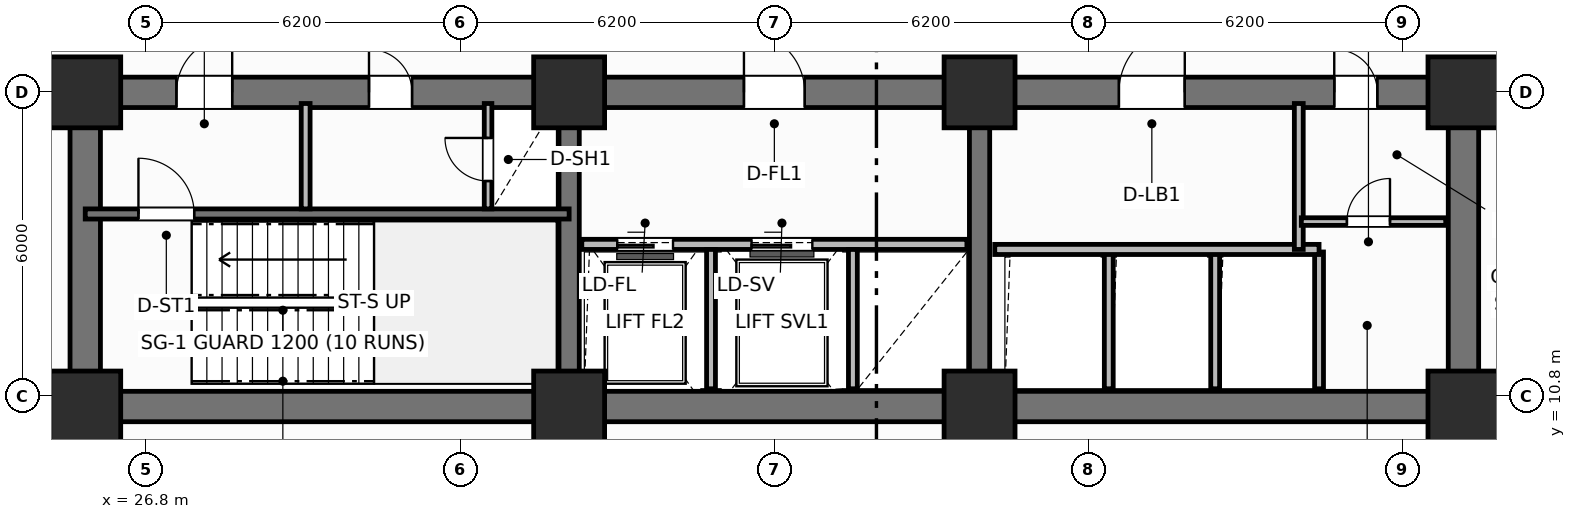
"""IFC4 building model, lengths in metres.
Left out: names, types, materials, properties, quantities, classifications, styles, units other than length and angle.
Written with IfcOpenShell. Run it as: python <this file> out.ifc"""

import sys

from ifc_helpers import new_model, si_unit, direction, frame, frame_2d, origin, origin_2d, place, context, subcontext, project, spatial, rectangle, extrude, element, fill, save


model = new_model("IFC4")
c1 = context("Model", 3, precision=1e-05, world=origin(), true_north=direction((0.0, 1.0)))
c2 = subcontext(c1, "Body", "Model", "MODEL_VIEW")
j1 = project(units=[si_unit("LENGTHUNIT", "METRE"), si_unit("PLANEANGLEUNIT", "RADIAN")], contexts=[c1])
p1 = place(None, origin())
s1 = spatial("IfcSite", under=j1, at=p1, CompositionType="ELEMENT")
p2 = place(p1, origin())
s2 = spatial("IfcBuilding", under=s1, at=p2, CompositionType="ELEMENT")
p3 = place(p2, frame((0.0, 0.0, 20.1)))
s3 = spatial("IfcBuildingStorey", under=s2, at=p3, CompositionType="ELEMENT", Elevation=20.1)
p4 = place(p3, frame((52.8, 10.6, 0.0), z_axis=(0.0, 0.0, 1.0), x_axis=(-1.0, 0.0, 0.0)))
e1 = element("IfcWall", 1, at=p4, inside=s3, PredefinedType="SHEAR", context=c2, shape_type="SweptSolid", body=[
    extrude(rectangle(XDim=27.2, YDim=0.6, at=frame_2d((13.6, 0.0))), origin(), (0.0, 0.0, 1.0), 4.5),
])
for number, where, z_axis, x_axis in (
    (2, (25.6, 10.9, 0.0), (0.0, 0.0, 1.0), (0.0, 1.0, 0.0)),
    (3, (52.8, 10.9, 0.0), (0.0, 0.0, 1.0), (0.0, 1.0, 0.0)),
):
    element("IfcWall", number, at=place(p3, frame(where, z_axis=z_axis, x_axis=x_axis)), inside=s3, PredefinedType="SHEAR", context=c2, shape_type="SweptSolid", body=[
        extrude(rectangle(XDim=5.6, YDim=0.6, at=frame_2d((2.8, 0.0))), origin(), (0.0, 0.0, 1.0), 4.5),
    ])
p5 = place(p3, frame((25.6, 16.8, 0.0), z_axis=(0.0, 0.0, 1.0), x_axis=(1.0, 0.0, 0.0)))
e4 = element("IfcWall", 4, at=p5, inside=s3, PredefinedType="SHEAR", context=c2, shape_type="SweptSolid", body=[
    extrude(rectangle(XDim=27.2, YDim=0.6, at=frame_2d((13.6, 0.0))), origin(), (0.0, 0.0, 1.0), 4.5),
])
p6 = place(p5, frame((1.8, 0.0, 0.0)))
e5 = element("IfcOpeningElement", 5, at=p6, cuts=e4, PredefinedType="OPENING", context=c2, shape_type="SweptSolid", body=[
    extrude(rectangle(XDim=1.1, YDim=2.15, at=frame_2d((0.55, 1.075))), frame((0.0, 0.31, 0.0), z_axis=(0.0, -1.0, 0.0), x_axis=(1.0, 0.0, 0.0)), (0.0, 0.0, 1.0), 0.62),
])
p7 = place(p5, frame((5.6, 0.0, 0.0)))
e6 = element("IfcOpeningElement", 6, at=p7, cuts=e4, PredefinedType="OPENING", context=c2, shape_type="SweptSolid", body=[
    extrude(rectangle(XDim=0.85, YDim=2.1, at=frame_2d((0.425, 1.05))), frame((0.0, 0.31, 0.0), z_axis=(0.0, -1.0, 0.0), x_axis=(1.0, 0.0, 0.0)), (0.0, 0.0, 1.0), 0.62),
])
p8 = place(p5, frame((13.0, 0.0, 0.0)))
e7 = element("IfcOpeningElement", 7, at=p8, cuts=e4, PredefinedType="OPENING", context=c2, shape_type="SweptSolid", body=[
    extrude(rectangle(XDim=1.2, YDim=2.15, at=frame_2d((0.6, 1.075))), frame((0.0, 0.31, 0.0), z_axis=(0.0, -1.0, 0.0), x_axis=(1.0, 0.0, 0.0)), (0.0, 0.0, 1.0), 0.62),
])
p9 = place(p5, frame((20.4, 0.0, 0.0)))
e8 = element("IfcOpeningElement", 8, at=p9, cuts=e4, PredefinedType="OPENING", context=c2, shape_type="SweptSolid", body=[
    extrude(rectangle(XDim=1.3, YDim=2.2, at=frame_2d((0.65, 1.1))), frame((0.0, 0.31, 0.0), z_axis=(0.0, -1.0, 0.0), x_axis=(1.0, 0.0, 0.0)), (0.0, 0.0, 1.0), 0.62),
])
p10 = place(p5, frame((24.65, 0.0, 0.0)))
e9 = element("IfcOpeningElement", 9, at=p10, cuts=e4, PredefinedType="OPENING", context=c2, shape_type="SweptSolid", body=[
    extrude(rectangle(XDim=0.85, YDim=2.1, at=frame_2d((0.425, 1.05))), frame((0.0, 0.31, 0.0), z_axis=(0.0, -1.0, 0.0), x_axis=(1.0, 0.0, 0.0)), (0.0, 0.0, 1.0), 0.62),
])
for number, where, z_axis, x_axis in (
    (10, (35.15, 10.9, 0.0), (0.0, 0.0, 1.0), (0.0, 1.0, 0.0)),
    (11, (43.25, 10.9, 0.0), (0.0, 0.0, 1.0), (0.0, 1.0, 0.0)),
):
    element("IfcWall", number, at=place(p3, frame(where, z_axis=z_axis, x_axis=x_axis)), inside=s3, PredefinedType="SHEAR", context=c2, shape_type="SweptSolid", body=[
        extrude(rectangle(XDim=5.6, YDim=0.4, at=frame_2d((2.8, 0.0))), origin(), (0.0, 0.0, 1.0), 4.5),
    ])
for number, where, z_axis, x_axis in (
    (12, (25.6, 10.6, 0.0), (0.0, 0.0, 1.0), (1.0, 0.0, 0.0)),
    (13, (25.6, 16.8, 0.0), (0.0, 0.0, 1.0), (1.0, 0.0, 0.0)),
    (14, (35.15, 10.6, 0.0), (0.0, 0.0, 1.0), (1.0, 0.0, 0.0)),
    (15, (35.15, 16.8, 0.0), (0.0, 0.0, 1.0), (1.0, 0.0, 0.0)),
    (16, (43.25, 10.6, 0.0), (0.0, 0.0, 1.0), (1.0, 0.0, 0.0)),
    (17, (43.25, 16.8, 0.0), (0.0, 0.0, 1.0), (1.0, 0.0, 0.0)),
    (18, (52.8, 10.6, 0.0), (0.0, 0.0, 1.0), (1.0, 0.0, 0.0)),
    (19, (52.8, 16.8, 0.0), (0.0, 0.0, 1.0), (1.0, 0.0, 0.0)),
):
    element("IfcColumn", number, at=place(p3, frame(where, z_axis=z_axis, x_axis=x_axis)), inside=s3, PredefinedType="COLUMN", context=c2, shape_type="SweptSolid", body=[
        extrude(rectangle(XDim=1.4, YDim=1.4, at=origin_2d()), origin(), (0.0, 0.0, 1.0), 4.5),
    ])
p11 = place(p3, frame((25.6, 14.4, 0.0), z_axis=(0.0, 0.0, 1.0), x_axis=(1.0, 0.0, 0.0)))
e20 = element("IfcWall", 20, at=p11, inside=s3, PredefinedType="SHEAR", context=c2, shape_type="SweptSolid", body=[
    extrude(rectangle(XDim=9.55, YDim=0.2, at=frame_2d((4.775, 0.0))), origin(), (0.0, 0.0, 1.0), 4.5),
])
p12 = place(p11, frame((1.05, 0.0, 0.0)))
e21 = element("IfcOpeningElement", 21, at=p12, cuts=e20, PredefinedType="OPENING", context=c2, shape_type="SweptSolid", body=[
    extrude(rectangle(XDim=1.1, YDim=2.15, at=frame_2d((0.55, 1.075))), frame((0.0, 0.11, 0.0), z_axis=(0.0, -1.0, 0.0), x_axis=(1.0, 0.0, 0.0)), (0.0, 0.0, 1.0), 0.22),
])
p13 = place(p3, frame((29.95, 14.5, 0.0), z_axis=(0.0, 0.0, 1.0), x_axis=(0.0, 1.0, 0.0)))
e22 = element("IfcWall", 22, at=p13, inside=s3, PredefinedType="PARTITIONING", context=c2, shape_type="SweptSolid", body=[
    extrude(rectangle(XDim=2.08, YDim=0.175, at=frame_2d((1.04, 0.0))), origin(), (0.0, 0.0, 1.0), 2.26),
])
p14 = place(p3, frame((33.55, 14.5, 0.0), z_axis=(0.0, 0.0, 1.0), x_axis=(0.0, 1.0, 0.0)))
e23 = element("IfcWall", 23, at=p14, inside=s3, PredefinedType="PARTITIONING", context=c2, shape_type="SweptSolid", body=[
    extrude(rectangle(XDim=2.08, YDim=0.15, at=frame_2d((1.04, 0.0))), origin(), (0.0, 0.0, 1.0), 2.26),
])
p15 = place(p14, frame((0.55, 0.0, 0.0)))
e24 = element("IfcOpeningElement", 24, at=p15, cuts=e23, PredefinedType="OPENING", context=c2, shape_type="SweptSolid", body=[
    extrude(rectangle(XDim=0.85, YDim=2.05, at=frame_2d((0.425, 1.025))), frame((0.0, 0.085, 0.0), z_axis=(0.0, -1.0, 0.0), x_axis=(1.0, 0.0, 0.0)), (0.0, 0.0, 1.0), 0.17),
])
p16 = place(p3, frame((35.4, 13.8, 0.0), z_axis=(0.0, 0.0, 1.0), x_axis=(1.0, 0.0, 0.0)))
e25 = element("IfcWall", 25, at=p16, inside=s3, PredefinedType="PARTITIONING", context=c2, shape_type="SweptSolid", body=[
    extrude(rectangle(XDim=7.6, YDim=0.2, at=frame_2d((3.8, 0.0))), origin(), (0.0, 0.0, 1.0), 2.26),
])
p17 = place(p16, frame((0.7, 0.0, 0.0)))
e26 = element("IfcOpeningElement", 26, at=p17, cuts=e25, PredefinedType="OPENING", context=c2, shape_type="SweptSolid", body=[
    extrude(rectangle(XDim=1.1, YDim=2.15, at=frame_2d((0.55, 1.075))), frame((0.0, 0.11, 0.0), z_axis=(0.0, -1.0, 0.0), x_axis=(1.0, 0.0, 0.0)), (0.0, 0.0, 1.0), 0.22),
])
p18 = place(p16, frame((3.35, 0.0, 0.0)))
e27 = element("IfcOpeningElement", 27, at=p18, cuts=e25, PredefinedType="OPENING", context=c2, shape_type="SweptSolid", body=[
    extrude(rectangle(XDim=1.2, YDim=2.15, at=frame_2d((0.6, 1.075))), frame((0.0, 0.11, 0.0), z_axis=(0.0, -1.0, 0.0), x_axis=(1.0, 0.0, 0.0)), (0.0, 0.0, 1.0), 0.22),
])
for number, where, z_axis, x_axis in (
    (28, (37.95, 10.95, 0.0), (0.0, 0.0, 1.0), (0.0, 1.0, 0.0)),
    (29, (40.75, 10.95, 0.0), (0.0, 0.0, 1.0), (0.0, 1.0, 0.0)),
):
    element("IfcWall", number, at=place(p3, frame(where, z_axis=z_axis, x_axis=x_axis)), inside=s3, PredefinedType="PARTITIONING", context=c2, shape_type="SweptSolid", body=[
        extrude(rectangle(XDim=2.75, YDim=0.175, at=frame_2d((1.375, 0.0))), origin(), (0.0, 0.0, 1.0), 2.26),
    ])
for number, where, z_axis, x_axis in (
    (30, (45.8, 10.95, 0.0), (0.0, 0.0, 1.0), (0.0, 1.0, 0.0)),
    (31, (47.9, 10.95, 0.0), (0.0, 0.0, 1.0), (0.0, 1.0, 0.0)),
    (32, (49.95, 10.95, 0.0), (0.0, 0.0, 1.0), (0.0, 1.0, 0.0)),
):
    element("IfcWall", number, at=place(p3, frame(where, z_axis=z_axis, x_axis=x_axis)), inside=s3, PredefinedType="PARTITIONING", context=c2, shape_type="SweptSolid", body=[
        extrude(rectangle(XDim=2.7, YDim=0.175, at=frame_2d((1.35, 0.0))), origin(), (0.0, 0.0, 1.0), 2.26),
    ])
p19 = place(p3, frame((43.55, 13.7, 0.0), z_axis=(0.0, 0.0, 1.0), x_axis=(1.0, 0.0, 0.0)))
e33 = element("IfcWall", 33, at=p19, inside=s3, PredefinedType="PARTITIONING", context=c2, shape_type="SweptSolid", body=[
    extrude(rectangle(XDim=6.4, YDim=0.2, at=frame_2d((3.2, 0.0))), origin(), (0.0, 0.0, 1.0), 2.26),
])
p20 = place(p3, frame((49.55, 13.7, 0.0), z_axis=(0.0, 0.0, 1.0), x_axis=(0.0, 1.0, 0.0)))
e34 = element("IfcWall", 34, at=p20, inside=s3, PredefinedType="PARTITIONING", context=c2, shape_type="SweptSolid", body=[
    extrude(rectangle(XDim=2.88, YDim=0.175, at=frame_2d((1.44, 0.0))), origin(), (0.0, 0.0, 1.0), 2.26),
])
p21 = place(p3, frame((49.6, 14.25, 0.0), z_axis=(0.0, 0.0, 1.0), x_axis=(1.0, 0.0, 0.0)))
e35 = element("IfcWall", 35, at=p21, inside=s3, PredefinedType="PARTITIONING", context=c2, shape_type="SweptSolid", body=[
    extrude(rectangle(XDim=2.85, YDim=0.15, at=frame_2d((1.425, 0.0))), origin(), (0.0, 0.0, 1.0), 2.26),
])
p22 = place(p21, frame((0.9, 0.0, 0.0)))
e36 = element("IfcOpeningElement", 36, at=p22, cuts=e35, PredefinedType="OPENING", context=c2, shape_type="SweptSolid", body=[
    extrude(rectangle(XDim=0.85, YDim=2.1, at=frame_2d((0.425, 1.05))), frame((0.0, 0.085, 0.0), z_axis=(0.0, -1.0, 0.0), x_axis=(1.0, 0.0, 0.0)), (0.0, 0.0, 1.0), 0.17),
])
p23 = place(p3, frame((12.0, 16.85, 0.0), z_axis=(0.0, 0.0, 1.0), x_axis=(1.0, 0.0, 0.0)))
e37 = element("IfcWall", 37, at=p23, inside=s3, PredefinedType="PARTITIONING", context=c2, shape_type="SweptSolid", body=[
    extrude(rectangle(XDim=13.25, YDim=0.15, at=frame_2d((6.625, 0.0))), origin(), (0.0, 0.0, 1.0), 2.26),
])
p24 = place(p23, frame((7.5, 0.0, 0.0)))
e38 = element("IfcOpeningElement", 38, at=p24, cuts=e37, PredefinedType="OPENING", context=c2, shape_type="SweptSolid", body=[
    extrude(rectangle(XDim=1.0, YDim=2.15, at=frame_2d((0.5, 1.075))), frame((0.0, 0.085, 0.0), z_axis=(0.0, -1.0, 0.0), x_axis=(1.0, 0.0, 0.0)), (0.0, 0.0, 1.0), 0.17),
])
p25 = place(p3, frame((53.15, 16.85, 0.0), z_axis=(0.0, 0.0, 1.0), x_axis=(1.0, 0.0, 0.0)))
e39 = element("IfcWall", 39, at=p25, inside=s3, PredefinedType="PARTITIONING", context=c2, shape_type="SweptSolid", body=[
    extrude(rectangle(XDim=13.25, YDim=0.15, at=frame_2d((6.625, 0.0))), origin(), (0.0, 0.0, 1.0), 2.26),
])
p26 = place(p25, frame((4.2, 0.0, 0.0)))
e40 = element("IfcOpeningElement", 40, at=p26, cuts=e39, PredefinedType="OPENING", context=c2, shape_type="SweptSolid", body=[
    extrude(rectangle(XDim=1.0, YDim=2.15, at=frame_2d((0.5, 1.075))), frame((0.0, 0.085, 0.0), z_axis=(0.0, -1.0, 0.0), x_axis=(1.0, 0.0, 0.0)), (0.0, 0.0, 1.0), 0.17),
])
p27 = place(p12, origin())
e41 = element("IfcDoor", 41, at=p27, inside=s3, OperationType="SINGLE_SWING_LEFT", PredefinedType="DOOR", context=c2, shape_type="SweptSolid", body=[
    extrude(rectangle(XDim=1.1, YDim=2.15, at=frame_2d((0.55, 1.075))), frame((0.0, 0.025, 0.0), z_axis=(0.0, -1.0, 0.0), x_axis=(1.0, 0.0, 0.0)), (0.0, 0.0, 1.0), 0.05),
])
fill(e21, e41)
p28 = place(p15, origin())
e42 = element("IfcDoor", 42, at=p28, inside=s3, OperationType="SINGLE_SWING_RIGHT", PredefinedType="TRAPDOOR", context=c2, shape_type="SweptSolid", body=[
    extrude(rectangle(XDim=0.85, YDim=2.05, at=frame_2d((0.425, 1.025))), frame((0.0, 0.025, 0.0), z_axis=(0.0, -1.0, 0.0), x_axis=(1.0, 0.0, 0.0)), (0.0, 0.0, 1.0), 0.05),
])
fill(e24, e42)
p29 = place(p17, origin())
e43 = element("IfcDoor", 43, at=p29, inside=s3, OperationType="SLIDING_TO_LEFT", PredefinedType="DOOR", context=c2, shape_type="SweptSolid", body=[
    extrude(rectangle(XDim=1.1, YDim=2.15, at=frame_2d((0.55, 1.075))), frame((0.0, 0.025, 0.0), z_axis=(0.0, -1.0, 0.0), x_axis=(1.0, 0.0, 0.0)), (0.0, 0.0, 1.0), 0.05),
])
fill(e26, e43)
p30 = place(p18, origin())
e44 = element("IfcDoor", 44, at=p30, inside=s3, OperationType="SLIDING_TO_LEFT", PredefinedType="DOOR", context=c2, shape_type="SweptSolid", body=[
    extrude(rectangle(XDim=1.2, YDim=2.15, at=frame_2d((0.6, 1.075))), frame((0.0, 0.025, 0.0), z_axis=(0.0, -1.0, 0.0), x_axis=(1.0, 0.0, 0.0)), (0.0, 0.0, 1.0), 0.05),
])
fill(e27, e44)
p31 = place(p22, origin())
e45 = element("IfcDoor", 45, at=p31, inside=s3, OperationType="SINGLE_SWING_RIGHT", PredefinedType="DOOR", context=c2, shape_type="SweptSolid", body=[
    extrude(rectangle(XDim=0.85, YDim=2.1, at=frame_2d((0.425, 1.05))), frame((0.0, 0.025, 0.0), z_axis=(0.0, -1.0, 0.0), x_axis=(1.0, 0.0, 0.0)), (0.0, 0.0, 1.0), 0.05),
])
fill(e36, e45)
p32 = place(p6, origin())
e46 = element("IfcDoor", 46, at=p32, inside=s3, OperationType="SINGLE_SWING_RIGHT", PredefinedType="DOOR", context=c2, shape_type="SweptSolid", body=[
    extrude(rectangle(XDim=1.1, YDim=2.15, at=frame_2d((0.55, 1.075))), frame((0.0, 0.025, 0.0), z_axis=(0.0, -1.0, 0.0), x_axis=(1.0, 0.0, 0.0)), (0.0, 0.0, 1.0), 0.05),
])
fill(e5, e46)
p33 = place(p7, origin())
e47 = element("IfcDoor", 47, at=p33, inside=s3, OperationType="SINGLE_SWING_LEFT", PredefinedType="DOOR", context=c2, shape_type="SweptSolid", body=[
    extrude(rectangle(XDim=0.85, YDim=2.1, at=frame_2d((0.425, 1.05))), frame((0.0, 0.025, 0.0), z_axis=(0.0, -1.0, 0.0), x_axis=(1.0, 0.0, 0.0)), (0.0, 0.0, 1.0), 0.05),
])
fill(e6, e47)
p34 = place(p8, origin())
e48 = element("IfcDoor", 48, at=p34, inside=s3, OperationType="SINGLE_SWING_LEFT", PredefinedType="DOOR", context=c2, shape_type="SweptSolid", body=[
    extrude(rectangle(XDim=1.2, YDim=2.15, at=frame_2d((0.6, 1.075))), frame((0.0, 0.025, 0.0), z_axis=(0.0, -1.0, 0.0), x_axis=(1.0, 0.0, 0.0)), (0.0, 0.0, 1.0), 0.05),
])
fill(e7, e48)
p35 = place(p9, origin())
e49 = element("IfcDoor", 49, at=p35, inside=s3, OperationType="SINGLE_SWING_RIGHT", PredefinedType="DOOR", context=c2, shape_type="SweptSolid", body=[
    extrude(rectangle(XDim=1.3, YDim=2.2, at=frame_2d((0.65, 1.1))), frame((0.0, 0.025, 0.0), z_axis=(0.0, -1.0, 0.0), x_axis=(1.0, 0.0, 0.0)), (0.0, 0.0, 1.0), 0.05),
])
fill(e8, e49)
p36 = place(p10, origin())
e50 = element("IfcDoor", 50, at=p36, inside=s3, OperationType="SINGLE_SWING_LEFT", PredefinedType="DOOR", context=c2, shape_type="SweptSolid", body=[
    extrude(rectangle(XDim=0.85, YDim=2.1, at=frame_2d((0.425, 1.05))), frame((0.0, 0.025, 0.0), z_axis=(0.0, -1.0, 0.0), x_axis=(1.0, 0.0, 0.0)), (0.0, 0.0, 1.0), 0.05),
])
fill(e9, e50)
save(model, sys.argv[1])
